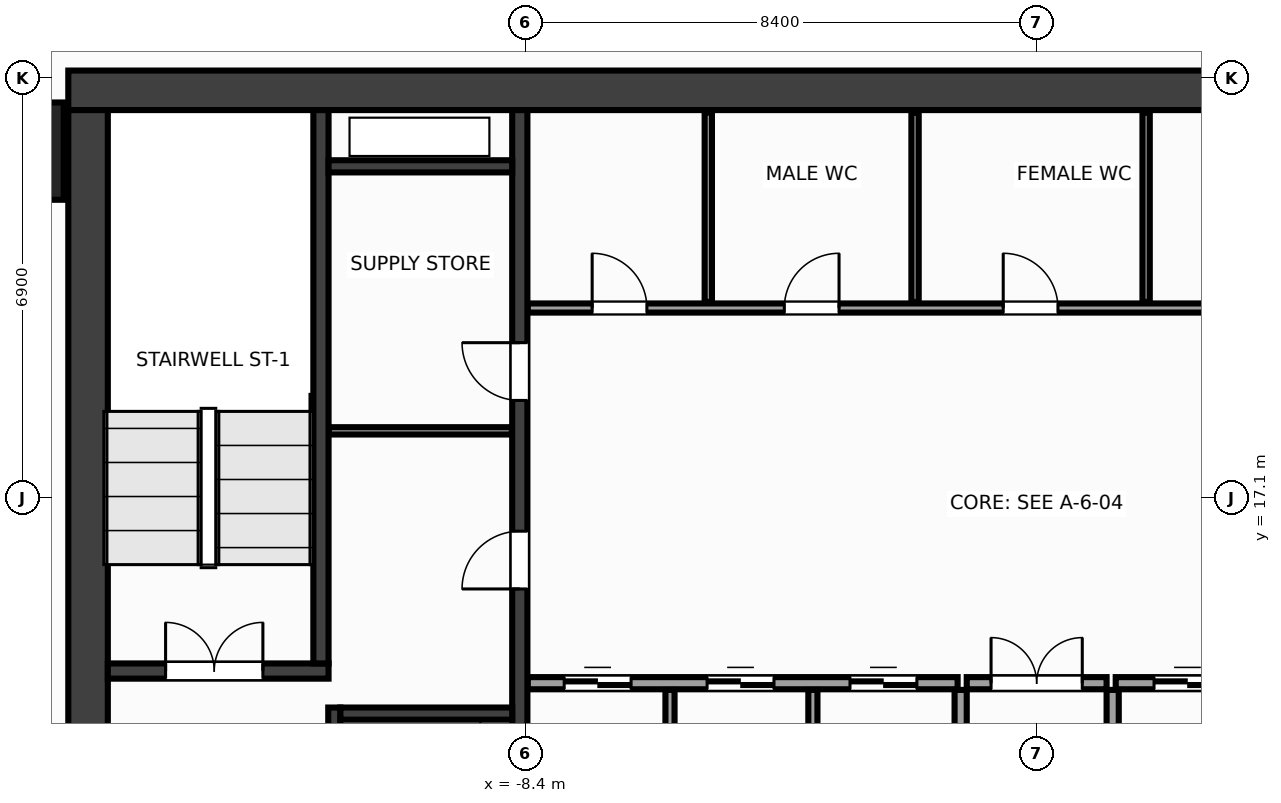
"""IFC4 building model, lengths in metres.
Left out: names, types, materials, properties, quantities, classifications, styles, units other than length and angle.
Written with IfcOpenShell. Run it as: python <this file> out.ifc"""

import sys

from ifc_helpers import new_model, si_unit, direction, frame, frame_2d, origin, origin_2d, place, context, subcontext, project, spatial, rectangle, extrude, source, transform, mapped, element, fill, save


model = new_model("IFC4")
c1 = context("Model", 3, precision=1e-05, world=origin(), true_north=direction((0.0, 1.0)))
c2 = subcontext(c1, "Body", "Model", "MODEL_VIEW")
j1 = project(units=[si_unit("LENGTHUNIT", "METRE"), si_unit("PLANEANGLEUNIT", "RADIAN")], contexts=[c1])
p1 = place(None, origin())
s1 = spatial("IfcSite", under=j1, at=p1, CompositionType="ELEMENT")
p2 = place(p1, origin())
s2 = spatial("IfcBuilding", under=s1, at=p2, CompositionType="ELEMENT")
p3 = place(p2, frame((0.0, 0.0, 77.6)))
s3 = spatial("IfcBuildingStorey", under=s2, at=p3, CompositionType="ELEMENT", Elevation=77.6)
m1 = source(origin(), c2, "Body", "SweptSolid", [
    extrude(rectangle(XDim=31.85, YDim=0.65, at=frame_2d((15.925, 0.0))), origin(), (0.0, 0.0, 1.0), 3.6),
])
p4 = place(p3, frame((-15.925, 23.8, 0.0), z_axis=(0.0, 0.0, 1.0), x_axis=(1.0, 0.0, 0.0)))
e1 = element("IfcWall", 1, at=p4, inside=s3, PredefinedType="SHEAR", context=c2, shape_type="MappedRepresentation", body=[
    mapped(m1, transform((0.0, 0.0, 0.0), x_axis=(1.0, 0.0, 0.0), y_axis=(0.0, 1.0, 0.0), z_axis=(0.0, 0.0, 1.0), scale=1.0)),
])
m2 = source(origin(), c2, "Body", "SweptSolid", [
    extrude(rectangle(XDim=12.95, YDim=0.65, at=frame_2d((6.475, 0.0))), origin(), (0.0, 0.0, 1.0), 3.6),
])
p5 = place(p3, frame((-15.6, 10.525, 0.0), z_axis=(0.0, 0.0, 1.0), x_axis=(0.0, 1.0, 0.0)))
e2 = element("IfcWall", 2, at=p5, inside=s3, PredefinedType="SHEAR", context=c2, shape_type="MappedRepresentation", body=[
    mapped(m2, transform((0.0, 0.0, 0.0), x_axis=(1.0, 0.0, 0.0), y_axis=(0.0, 1.0, 0.0), z_axis=(0.0, 0.0, 1.0), scale=1.0)),
])
m3 = source(origin(), c2, "Body", "SweptSolid", [
    extrude(rectangle(XDim=12.95, YDim=0.25, at=frame_2d((6.475, 0.0))), origin(), (0.0, 0.0, 1.0), 3.6),
])
p6 = place(p3, frame((-8.5, 10.525, 0.0), z_axis=(0.0, 0.0, 1.0), x_axis=(0.0, 1.0, 0.0)))
e3 = element("IfcWall", 3, at=p6, inside=s3, PredefinedType="SHEAR", context=c2, shape_type="MappedRepresentation", body=[
    mapped(m3, transform((0.0, 0.0, 0.0), x_axis=(1.0, 0.0, 0.0), y_axis=(0.0, 1.0, 0.0), z_axis=(0.0, 0.0, 1.0), scale=1.0)),
])
p7 = place(p6, frame((5.075, 0.0, 0.0)))
e4 = element("IfcOpeningElement", 4, at=p7, cuts=e3, PredefinedType="OPENING", context=c2, shape_type="SweptSolid", body=[
    extrude(rectangle(XDim=0.95, YDim=2.15, at=frame_2d((0.475, 1.075))), frame((0.0, 0.137, 0.0), z_axis=(0.0, -1.0, 0.0), x_axis=(1.0, 0.0, 0.0)), (0.0, 0.0, 1.0), 0.274),
])
p8 = place(p6, frame((8.175, 0.0, 0.0)))
e5 = element("IfcOpeningElement", 5, at=p8, cuts=e3, PredefinedType="OPENING", context=c2, shape_type="SweptSolid", body=[
    extrude(rectangle(XDim=0.95, YDim=2.15, at=frame_2d((0.475, 1.075))), frame((0.0, 0.137, 0.0), z_axis=(0.0, -1.0, 0.0), x_axis=(1.0, 0.0, 0.0)), (0.0, 0.0, 1.0), 0.274),
])
m4 = source(origin(), c2, "Body", "SweptSolid", [
    extrude(rectangle(XDim=3.63, YDim=0.25, at=frame_2d((1.815, 0.0))), origin(), (0.0, 0.0, 1.0), 3.6),
])
p9 = place(p3, frame((-15.275, 14.25, 0.0), z_axis=(0.0, 0.0, 1.0), x_axis=(1.0, 0.0, 0.0)))
e6 = element("IfcWall", 6, at=p9, inside=s3, PredefinedType="SHEAR", context=c2, shape_type="MappedRepresentation", body=[
    mapped(m4, transform((0.0, 0.0, 0.0), x_axis=(1.0, 0.0, 0.0), y_axis=(0.0, 1.0, 0.0), z_axis=(0.0, 0.0, 1.0), scale=1.0)),
])
p10 = place(p9, frame((0.95, 0.0, 0.0)))
e7 = element("IfcOpeningElement", 7, at=p10, cuts=e6, PredefinedType="OPENING", context=c2, shape_type="SweptSolid", body=[
    extrude(rectangle(XDim=1.6, YDim=2.15, at=frame_2d((0.8, 1.075))), frame((0.0, 0.137, 0.0), z_axis=(0.0, -1.0, 0.0), x_axis=(1.0, 0.0, 0.0)), (0.0, 0.0, 1.0), 0.274),
])
m5 = source(origin(), c2, "Body", "SweptSolid", [
    extrude(rectangle(XDim=9.1, YDim=0.25, at=frame_2d((4.55, 0.0))), origin(), (0.0, 0.0, 1.0), 3.6),
])
p11 = place(p3, frame((-11.77, 14.375, 0.0), z_axis=(0.0, 0.0, 1.0), x_axis=(0.0, 1.0, 0.0)))
e8 = element("IfcWall", 8, at=p11, inside=s3, PredefinedType="SHEAR", context=c2, shape_type="MappedRepresentation", body=[
    mapped(m5, transform((0.0, 0.0, 0.0), x_axis=(1.0, 0.0, 0.0), y_axis=(0.0, 1.0, 0.0), z_axis=(0.0, 0.0, 1.0), scale=1.0)),
])
m6 = source(origin(), c2, "Body", "SweptSolid", [
    extrude(rectangle(XDim=3.125, YDim=0.2, at=frame_2d((1.562, 0.0))), origin(), (0.0, 0.0, 1.0), 3.6),
])
p12 = place(p3, frame((-11.55, 10.525, 0.0), z_axis=(0.0, 0.0, 1.0), x_axis=(0.0, 1.0, 0.0)))
e9 = element("IfcWall", 9, at=p12, inside=s3, PredefinedType="SHEAR", context=c2, shape_type="MappedRepresentation", body=[
    mapped(m6, transform((0.0, 0.0, 0.0), x_axis=(1.0, 0.0, 0.0), y_axis=(0.0, 1.0, 0.0), z_axis=(0.0, 0.0, 1.0), scale=1.0)),
])
p13 = place(p12, frame((0.9, 0.0, 0.0)))
e10 = element("IfcOpeningElement", 10, at=p13, cuts=e9, PredefinedType="OPENING", context=c2, shape_type="SweptSolid", body=[
    extrude(rectangle(XDim=1.1, YDim=2.15, at=frame_2d((0.55, 1.075))), frame((0.0, 0.112, 0.0), z_axis=(0.0, -1.0, 0.0), x_axis=(1.0, 0.0, 0.0)), (0.0, 0.0, 1.0), 0.224),
])
m7 = source(origin(), c2, "Body", "SweptSolid", [
    extrude(rectangle(XDim=2.825, YDim=0.2, at=frame_2d((1.413, 0.0))), origin(), (0.0, 0.0, 1.0), 3.6),
])
p14 = place(p3, frame((-11.45, 13.55, 0.0), z_axis=(0.0, 0.0, 1.0), x_axis=(1.0, 0.0, 0.0)))
e11 = element("IfcWall", 11, at=p14, inside=s3, PredefinedType="SHEAR", context=c2, shape_type="MappedRepresentation", body=[
    mapped(m7, transform((0.0, 0.0, 0.0), x_axis=(1.0, 0.0, 0.0), y_axis=(0.0, 1.0, 0.0), z_axis=(0.0, 0.0, 1.0), scale=1.0)),
])
m8 = source(origin(), c2, "Body", "SweptSolid", [
    extrude(rectangle(XDim=3.02, YDim=0.2, at=frame_2d((1.51, 0.0))), origin(), (0.0, 0.0, 1.0), 3.6),
])
p15 = place(p3, frame((-11.645, 22.55, 0.0), z_axis=(0.0, 0.0, 1.0), x_axis=(1.0, 0.0, 0.0)))
e12 = element("IfcWall", 12, at=p15, inside=s3, PredefinedType="SHEAR", context=c2, shape_type="MappedRepresentation", body=[
    mapped(m8, transform((0.0, 0.0, 0.0), x_axis=(1.0, 0.0, 0.0), y_axis=(0.0, 1.0, 0.0), z_axis=(0.0, 0.0, 1.0), scale=1.0)),
])
m9 = source(origin(), c2, "Body", "SweptSolid", [
    extrude(rectangle(XDim=1.6, YDim=1.6, at=origin_2d()), origin(), (0.0, 0.0, 1.0), 3.6),
])
p16 = place(p3, frame((-16.8, 22.8, 0.0), z_axis=(0.0, 0.0, 1.0), x_axis=(1.0, 0.0, 0.0)))
e13 = element("IfcColumn", 13, at=p16, inside=s3, PredefinedType="COLUMN", context=c2, shape_type="MappedRepresentation", body=[
    mapped(m9, transform((0.0, 0.0, 0.0), x_axis=(1.0, 0.0, 0.0), y_axis=(0.0, 1.0, 0.0), z_axis=(0.0, 0.0, 1.0), scale=1.0)),
])
m10 = source(origin(), c2, "Body", "SweptSolid", [
    extrude(rectangle(XDim=3.01, YDim=0.12, at=frame_2d((1.505, 0.0))), origin(), (0.0, 0.0, 1.0), 3.36),
])
p17 = place(p3, frame((-11.64, 18.2, 0.0), z_axis=(0.0, 0.0, 1.0), x_axis=(1.0, 0.0, 0.0)))
e14 = element("IfcWall", 14, at=p17, inside=s3, PredefinedType="PARTITIONING", context=c2, shape_type="MappedRepresentation", body=[
    mapped(m10, transform((0.0, 0.0, 0.0), x_axis=(1.0, 0.0, 0.0), y_axis=(0.0, 1.0, 0.0), z_axis=(0.0, 0.0, 1.0), scale=1.0)),
])
m11 = source(origin(), c2, "Body", "SweptSolid", [
    extrude(rectangle(XDim=7.07, YDim=0.2, at=frame_2d((3.535, 0.0))), origin(), (0.0, 0.0, 1.0), 3.36),
])
p18 = place(p3, frame((-8.37, 14.05, 0.0), z_axis=(0.0, 0.0, 1.0), x_axis=(1.0, 0.0, 0.0)))
e15 = element("IfcWall", 15, at=p18, inside=s3, PredefinedType="PARTITIONING", context=c2, shape_type="MappedRepresentation", body=[
    mapped(m11, transform((0.0, 0.0, 0.0), x_axis=(1.0, 0.0, 0.0), y_axis=(0.0, 1.0, 0.0), z_axis=(0.0, 0.0, 1.0), scale=1.0)),
])
p19 = place(p18, frame((0.6, 0.0, 0.0)))
e16 = element("IfcOpeningElement", 16, at=p19, cuts=e15, PredefinedType="OPENING", context=c2, shape_type="SweptSolid", body=[
    extrude(rectangle(XDim=1.1, YDim=2.15, at=frame_2d((0.55, 1.075))), frame((0.0, 0.112, 0.0), z_axis=(0.0, -1.0, 0.0), x_axis=(1.0, 0.0, 0.0)), (0.0, 0.0, 1.0), 0.224),
])
p20 = place(p18, frame((2.95, 0.0, 0.0)))
e17 = element("IfcOpeningElement", 17, at=p20, cuts=e15, PredefinedType="OPENING", context=c2, shape_type="SweptSolid", body=[
    extrude(rectangle(XDim=1.1, YDim=2.15, at=frame_2d((0.55, 1.075))), frame((0.0, 0.112, 0.0), z_axis=(0.0, -1.0, 0.0), x_axis=(1.0, 0.0, 0.0)), (0.0, 0.0, 1.0), 0.224),
])
p21 = place(p18, frame((5.3, 0.0, 0.0)))
e18 = element("IfcOpeningElement", 18, at=p21, cuts=e15, PredefinedType="OPENING", context=c2, shape_type="SweptSolid", body=[
    extrude(rectangle(XDim=1.1, YDim=2.15, at=frame_2d((0.55, 1.075))), frame((0.0, 0.112, 0.0), z_axis=(0.0, -1.0, 0.0), x_axis=(1.0, 0.0, 0.0)), (0.0, 0.0, 1.0), 0.224),
])
p22 = place(p3, frame((1.3, 14.05, 0.0), z_axis=(0.0, 0.0, 1.0), x_axis=(1.0, 0.0, 0.0)))
e19 = element("IfcWall", 19, at=p22, inside=s3, PredefinedType="PARTITIONING", context=c2, shape_type="MappedRepresentation", body=[
    mapped(m11, transform((0.0, 0.0, 0.0), x_axis=(1.0, 0.0, 0.0), y_axis=(0.0, 1.0, 0.0), z_axis=(0.0, 0.0, 1.0), scale=1.0)),
])
p23 = place(p22, frame((0.63, 0.0, 0.0)))
e20 = element("IfcOpeningElement", 20, at=p23, cuts=e19, PredefinedType="OPENING", context=c2, shape_type="SweptSolid", body=[
    extrude(rectangle(XDim=1.1, YDim=2.15, at=frame_2d((0.55, 1.075))), frame((0.0, 0.112, 0.0), z_axis=(0.0, -1.0, 0.0), x_axis=(1.0, 0.0, 0.0)), (0.0, 0.0, 1.0), 0.224),
])
p24 = place(p22, frame((2.98, 0.0, 0.0)))
e21 = element("IfcOpeningElement", 21, at=p24, cuts=e19, PredefinedType="OPENING", context=c2, shape_type="SweptSolid", body=[
    extrude(rectangle(XDim=1.1, YDim=2.15, at=frame_2d((0.55, 1.075))), frame((0.0, 0.112, 0.0), z_axis=(0.0, -1.0, 0.0), x_axis=(1.0, 0.0, 0.0)), (0.0, 0.0, 1.0), 0.224),
])
p25 = place(p22, frame((5.33, 0.0, 0.0)))
e22 = element("IfcOpeningElement", 22, at=p25, cuts=e19, PredefinedType="OPENING", context=c2, shape_type="SweptSolid", body=[
    extrude(rectangle(XDim=1.1, YDim=2.15, at=frame_2d((0.55, 1.075))), frame((0.0, 0.112, 0.0), z_axis=(0.0, -1.0, 0.0), x_axis=(1.0, 0.0, 0.0)), (0.0, 0.0, 1.0), 0.224),
])
m12 = source(origin(), c2, "Body", "SweptSolid", [
    extrude(rectangle(XDim=3.415, YDim=0.2, at=frame_2d((1.708, 0.0))), origin(), (0.0, 0.0, 1.0), 3.36),
])
for number, where, z_axis, x_axis in (
    (23, (-1.25, 10.525, 0.0), (0.0, 0.0, 1.0), (0.0, 1.0, 0.0)),
    (24, (1.25, 10.525, 0.0), (0.0, 0.0, 1.0), (0.0, 1.0, 0.0)),
):
    element("IfcWall", number, at=place(p3, frame(where, z_axis=z_axis, x_axis=x_axis)), inside=s3, PredefinedType="PARTITIONING", context=c2, shape_type="MappedRepresentation", body=[
        mapped(m12, transform((0.0, 0.0, 0.0), x_axis=(1.0, 0.0, 0.0), y_axis=(0.0, 1.0, 0.0), z_axis=(0.0, 0.0, 1.0), scale=1.0)),
    ])
m13 = source(origin(), c2, "Body", "SweptSolid", [
    extrude(rectangle(XDim=2.3, YDim=0.2, at=frame_2d((1.15, 0.0))), origin(), (0.0, 0.0, 1.0), 3.36),
])
p26 = place(p3, frame((-1.15, 14.05, 0.0), z_axis=(0.0, 0.0, 1.0), x_axis=(1.0, 0.0, 0.0)))
e25 = element("IfcWall", 25, at=p26, inside=s3, PredefinedType="PARTITIONING", context=c2, shape_type="MappedRepresentation", body=[
    mapped(m13, transform((0.0, 0.0, 0.0), x_axis=(1.0, 0.0, 0.0), y_axis=(0.0, 1.0, 0.0), z_axis=(0.0, 0.0, 1.0), scale=1.0)),
])
p27 = place(p26, frame((0.4, 0.0, 0.0)))
e26 = element("IfcOpeningElement", 26, at=p27, cuts=e25, PredefinedType="OPENING", context=c2, shape_type="SweptSolid", body=[
    extrude(rectangle(XDim=1.5, YDim=2.2, at=frame_2d((0.75, 1.1))), frame((0.0, 0.112, 0.0), z_axis=(0.0, -1.0, 0.0), x_axis=(1.0, 0.0, 0.0)), (0.0, 0.0, 1.0), 0.224),
])
m14 = source(origin(), c2, "Body", "SweptSolid", [
    extrude(rectangle(XDim=14.59, YDim=0.15, at=frame_2d((7.295, 0.0))), origin(), (0.0, 0.0, 1.0), 3.36),
])
p28 = place(p3, frame((-8.37, 20.22, 0.0), z_axis=(0.0, 0.0, 1.0), x_axis=(1.0, 0.0, 0.0)))
e27 = element("IfcWall", 27, at=p28, inside=s3, PredefinedType="PARTITIONING", context=c2, shape_type="MappedRepresentation", body=[
    mapped(m14, transform((0.0, 0.0, 0.0), x_axis=(1.0, 0.0, 0.0), y_axis=(0.0, 1.0, 0.0), z_axis=(0.0, 0.0, 1.0), scale=1.0)),
])
p29 = place(p28, frame((1.06, 0.0, 0.0)))
e28 = element("IfcOpeningElement", 28, at=p29, cuts=e27, PredefinedType="OPENING", context=c2, shape_type="SweptSolid", body=[
    extrude(rectangle(XDim=0.9, YDim=2.15, at=frame_2d((0.45, 1.075))), frame((0.0, 0.087, 0.0), z_axis=(0.0, -1.0, 0.0), x_axis=(1.0, 0.0, 0.0)), (0.0, 0.0, 1.0), 0.174),
])
p30 = place(p28, frame((4.22, 0.0, 0.0)))
e29 = element("IfcOpeningElement", 29, at=p30, cuts=e27, PredefinedType="OPENING", context=c2, shape_type="SweptSolid", body=[
    extrude(rectangle(XDim=0.9, YDim=2.15, at=frame_2d((0.45, 1.075))), frame((0.0, 0.087, 0.0), z_axis=(0.0, -1.0, 0.0), x_axis=(1.0, 0.0, 0.0)), (0.0, 0.0, 1.0), 0.174),
])
p31 = place(p28, frame((7.82, 0.0, 0.0)))
e30 = element("IfcOpeningElement", 30, at=p31, cuts=e27, PredefinedType="OPENING", context=c2, shape_type="SweptSolid", body=[
    extrude(rectangle(XDim=0.9, YDim=2.15, at=frame_2d((0.45, 1.075))), frame((0.0, 0.087, 0.0), z_axis=(0.0, -1.0, 0.0), x_axis=(1.0, 0.0, 0.0)), (0.0, 0.0, 1.0), 0.174),
])
p32 = place(p28, frame((11.87, 0.0, 0.0)))
e31 = element("IfcOpeningElement", 31, at=p32, cuts=e27, PredefinedType="OPENING", context=c2, shape_type="SweptSolid", body=[
    extrude(rectangle(XDim=0.9, YDim=2.15, at=frame_2d((0.45, 1.075))), frame((0.0, 0.087, 0.0), z_axis=(0.0, -1.0, 0.0), x_axis=(1.0, 0.0, 0.0)), (0.0, 0.0, 1.0), 0.174),
])
m15 = source(origin(), c2, "Body", "SweptSolid", [
    extrude(rectangle(XDim=3.415, YDim=0.15, at=frame_2d((1.708, 0.0))), origin(), (0.0, 0.0, 1.0), 3.36),
])
for number, where, z_axis, x_axis in (
    (32, (-6.03, 10.525, 0.0), (0.0, 0.0, 1.0), (0.0, 1.0, 0.0)),
    (33, (-3.68, 10.525, 0.0), (0.0, 0.0, 1.0), (0.0, 1.0, 0.0)),
):
    element("IfcWall", number, at=place(p3, frame(where, z_axis=z_axis, x_axis=x_axis)), inside=s3, PredefinedType="PARTITIONING", context=c2, shape_type="MappedRepresentation", body=[
        mapped(m15, transform((0.0, 0.0, 0.0), x_axis=(1.0, 0.0, 0.0), y_axis=(0.0, 1.0, 0.0), z_axis=(0.0, 0.0, 1.0), scale=1.0)),
    ])
m16 = source(origin(), c2, "Body", "SweptSolid", [
    extrude(rectangle(XDim=3.115, YDim=0.12, at=frame_2d((1.558, 0.0))), origin(), (0.0, 0.0, 1.0), 3.36),
])
for number, where, z_axis, x_axis in (
    (34, (-5.4, 20.32, 0.0), (0.0, 0.0, 1.0), (0.0, 1.0, 0.0)),
    (35, (-2.0, 20.32, 0.0), (0.0, 0.0, 1.0), (0.0, 1.0, 0.0)),
    (36, (1.8, 20.32, 0.0), (0.0, 0.0, 1.0), (0.0, 1.0, 0.0)),
):
    element("IfcWall", number, at=place(p3, frame(where, z_axis=z_axis, x_axis=x_axis)), inside=s3, PredefinedType="PARTITIONING", context=c2, shape_type="MappedRepresentation", body=[
        mapped(m16, transform((0.0, 0.0, 0.0), x_axis=(1.0, 0.0, 0.0), y_axis=(0.0, 1.0, 0.0), z_axis=(0.0, 0.0, 1.0), scale=1.0)),
    ])
m17 = source(origin(), c2, "Body", "SweptSolid", [
    extrude(rectangle(XDim=1.6, YDim=2.15, at=frame_2d((0.8, 1.075))), frame((0.0, 0.025, 0.0), z_axis=(0.0, -1.0, 0.0), x_axis=(1.0, 0.0, 0.0)), (0.0, 0.0, 1.0), 0.05),
])
p33 = place(p10, origin())
e37 = element("IfcDoor", 37, at=p33, inside=s3, OperationType="DOUBLE_DOOR_SINGLE_SWING", PredefinedType="DOOR", context=c2, shape_type="MappedRepresentation", body=[
    mapped(m17, transform((0.0, 0.0, 0.0), x_axis=(1.0, 0.0, 0.0), y_axis=(0.0, 1.0, 0.0), z_axis=(0.0, 0.0, 1.0), scale=1.0)),
])
fill(e7, e37)
m18 = source(origin(), c2, "Body", "SweptSolid", [
    extrude(rectangle(XDim=0.95, YDim=2.15, at=frame_2d((0.475, 1.075))), frame((0.0, 0.025, 0.0), z_axis=(0.0, -1.0, 0.0), x_axis=(1.0, 0.0, 0.0)), (0.0, 0.0, 1.0), 0.05),
])
p34 = place(p7, origin())
e38 = element("IfcDoor", 38, at=p34, inside=s3, OperationType="SINGLE_SWING_LEFT", PredefinedType="DOOR", context=c2, shape_type="MappedRepresentation", body=[
    mapped(m18, transform((0.0, 0.0, 0.0), x_axis=(1.0, 0.0, 0.0), y_axis=(0.0, 1.0, 0.0), z_axis=(0.0, 0.0, 1.0), scale=1.0)),
])
fill(e4, e38)
p35 = place(p8, origin())
e39 = element("IfcDoor", 39, at=p35, inside=s3, OperationType="SINGLE_SWING_RIGHT", PredefinedType="DOOR", context=c2, shape_type="MappedRepresentation", body=[
    mapped(m18, transform((0.0, 0.0, 0.0), x_axis=(1.0, 0.0, 0.0), y_axis=(0.0, 1.0, 0.0), z_axis=(0.0, 0.0, 1.0), scale=1.0)),
])
fill(e5, e39)
m19 = source(origin(), c2, "Body", "SweptSolid", [
    extrude(rectangle(XDim=1.1, YDim=2.15, at=frame_2d((0.55, 1.075))), frame((0.0, 0.025, 0.0), z_axis=(0.0, -1.0, 0.0), x_axis=(1.0, 0.0, 0.0)), (0.0, 0.0, 1.0), 0.05),
])
p36 = place(p19, origin())
e40 = element("IfcDoor", 40, at=p36, inside=s3, OperationType="DOUBLE_DOOR_SLIDING", PredefinedType="DOOR", context=c2, shape_type="MappedRepresentation", body=[
    mapped(m19, transform((0.0, 0.0, 0.0), x_axis=(1.0, 0.0, 0.0), y_axis=(0.0, 1.0, 0.0), z_axis=(0.0, 0.0, 1.0), scale=1.0)),
])
fill(e16, e40)
p37 = place(p20, origin())
e41 = element("IfcDoor", 41, at=p37, inside=s3, OperationType="DOUBLE_DOOR_SLIDING", PredefinedType="DOOR", context=c2, shape_type="MappedRepresentation", body=[
    mapped(m19, transform((0.0, 0.0, 0.0), x_axis=(1.0, 0.0, 0.0), y_axis=(0.0, 1.0, 0.0), z_axis=(0.0, 0.0, 1.0), scale=1.0)),
])
fill(e17, e41)
p38 = place(p21, origin())
e42 = element("IfcDoor", 42, at=p38, inside=s3, OperationType="DOUBLE_DOOR_SLIDING", PredefinedType="DOOR", context=c2, shape_type="MappedRepresentation", body=[
    mapped(m19, transform((0.0, 0.0, 0.0), x_axis=(1.0, 0.0, 0.0), y_axis=(0.0, 1.0, 0.0), z_axis=(0.0, 0.0, 1.0), scale=1.0)),
])
fill(e18, e42)
p39 = place(p23, origin())
e43 = element("IfcDoor", 43, at=p39, inside=s3, OperationType="DOUBLE_DOOR_SLIDING", PredefinedType="DOOR", context=c2, shape_type="MappedRepresentation", body=[
    mapped(m19, transform((0.0, 0.0, 0.0), x_axis=(1.0, 0.0, 0.0), y_axis=(0.0, 1.0, 0.0), z_axis=(0.0, 0.0, 1.0), scale=1.0)),
])
fill(e20, e43)
m20 = source(origin(), c2, "Body", "SweptSolid", [
    extrude(rectangle(XDim=1.5, YDim=2.2, at=frame_2d((0.75, 1.1))), frame((0.0, 0.025, 0.0), z_axis=(0.0, -1.0, 0.0), x_axis=(1.0, 0.0, 0.0)), (0.0, 0.0, 1.0), 0.05),
])
p40 = place(p27, origin())
e44 = element("IfcDoor", 44, at=p40, inside=s3, OperationType="DOUBLE_DOOR_SINGLE_SWING", PredefinedType="DOOR", context=c2, shape_type="MappedRepresentation", body=[
    mapped(m20, transform((0.0, 0.0, 0.0), x_axis=(1.0, 0.0, 0.0), y_axis=(0.0, 1.0, 0.0), z_axis=(0.0, 0.0, 1.0), scale=1.0)),
])
fill(e26, e44)
m21 = source(origin(), c2, "Body", "SweptSolid", [
    extrude(rectangle(XDim=0.9, YDim=2.15, at=frame_2d((0.45, 1.075))), frame((0.0, 0.025, 0.0), z_axis=(0.0, -1.0, 0.0), x_axis=(1.0, 0.0, 0.0)), (0.0, 0.0, 1.0), 0.05),
])
p41 = place(p29, origin())
e45 = element("IfcDoor", 45, at=p41, inside=s3, OperationType="SINGLE_SWING_LEFT", PredefinedType="DOOR", context=c2, shape_type="MappedRepresentation", body=[
    mapped(m21, transform((0.0, 0.0, 0.0), x_axis=(1.0, 0.0, 0.0), y_axis=(0.0, 1.0, 0.0), z_axis=(0.0, 0.0, 1.0), scale=1.0)),
])
fill(e28, e45)
p42 = place(p30, origin())
e46 = element("IfcDoor", 46, at=p42, inside=s3, OperationType="SINGLE_SWING_RIGHT", PredefinedType="DOOR", context=c2, shape_type="MappedRepresentation", body=[
    mapped(m21, transform((0.0, 0.0, 0.0), x_axis=(1.0, 0.0, 0.0), y_axis=(0.0, 1.0, 0.0), z_axis=(0.0, 0.0, 1.0), scale=1.0)),
])
fill(e29, e46)
p43 = place(p31, origin())
e47 = element("IfcDoor", 47, at=p43, inside=s3, OperationType="SINGLE_SWING_LEFT", PredefinedType="DOOR", context=c2, shape_type="MappedRepresentation", body=[
    mapped(m21, transform((0.0, 0.0, 0.0), x_axis=(1.0, 0.0, 0.0), y_axis=(0.0, 1.0, 0.0), z_axis=(0.0, 0.0, 1.0), scale=1.0)),
])
fill(e30, e47)
save(model, sys.argv[1])
